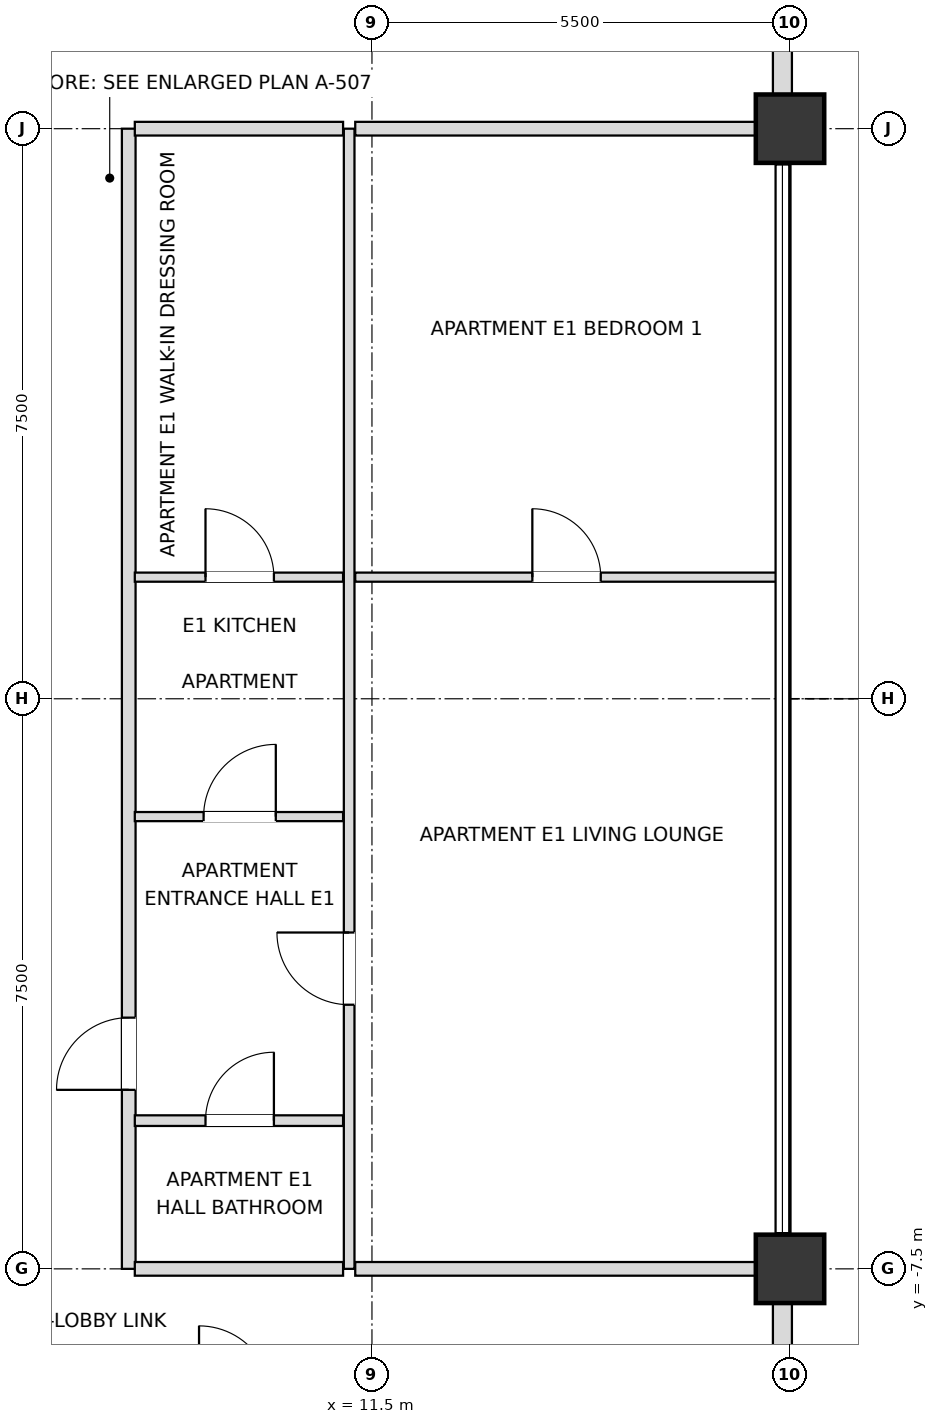
"""IFC4 building model, lengths in metres.
Left out: names, types, materials, properties, quantities, classifications, styles, units other than length and angle.
Written with IfcOpenShell. Run it as: python <this file> out.ifc"""

import sys

from ifc_helpers import new_model, si_unit, direction, frame, frame_2d, origin, origin_2d, place, context, subcontext, project, spatial, rectangle, extrude, element, fill, save


model = new_model("IFC4")
c1 = context("Model", 3, precision=1e-05, world=origin(), true_north=direction((0.0, 1.0)))
c2 = subcontext(c1, "Body", "Model", "MODEL_VIEW")
j1 = project(units=[si_unit("LENGTHUNIT", "METRE"), si_unit("PLANEANGLEUNIT", "RADIAN")], contexts=[c1])
p1 = place(None, origin())
s1 = spatial("IfcSite", under=j1, at=p1, CompositionType="ELEMENT")
p2 = place(p1, origin())
s2 = spatial("IfcBuilding", under=s1, at=p2, CompositionType="ELEMENT")
p3 = place(p2, frame((0.0, 0.0, 251.1)))
s3 = spatial("IfcBuildingStorey", under=s2, at=p3, CompositionType="ELEMENT", Elevation=251.1)
for number, where, z_axis, x_axis in (
    (1, (17.0, -7.5, 0.0), (0.0, 0.0, 1.0), (1.0, 0.0, 0.0)),
    (2, (17.0, 7.5, 0.0), (0.0, 0.0, 1.0), (1.0, 0.0, 0.0)),
):
    element("IfcColumn", number, at=place(p3, frame(where, z_axis=z_axis, x_axis=x_axis)), inside=s3, PredefinedType="USERDEFINED", context=c2, shape_type="SweptSolid", body=[
        extrude(rectangle(XDim=0.9, YDim=0.9, at=origin_2d()), origin(), (0.0, 0.0, 1.0), 3.6),
    ])
p4 = place(p3, frame((16.9, -12.555, 0.0), z_axis=(0.0, 0.0, 1.0), x_axis=(0.0, 1.0, 0.0)))
e3 = element("IfcWall", 3, at=p4, inside=s3, PredefinedType="SOLIDWALL", context=c2, shape_type="SweptSolid", body=[
    extrude(rectangle(XDim=4.61, YDim=0.25, at=frame_2d((2.305, 0.0))), origin(), (0.0, 0.0, 1.0), 2.748),
])
p5 = place(p4, frame((1.405, 0.0, 0.72)))
e4 = element("IfcOpeningElement", 4, at=p5, cuts=e3, PredefinedType="OPENING", context=c2, shape_type="SweptSolid", body=[
    extrude(rectangle(XDim=1.8, YDim=1.68, at=frame_2d((0.9, 0.84))), frame((0.0, 0.135, 0.0), z_axis=(0.0, -1.0, 0.0), x_axis=(1.0, 0.0, 0.0)), (0.0, 0.0, 1.0), 0.27),
])
p6 = place(p3, frame((16.9, 7.945, 0.0), z_axis=(0.0, 0.0, 1.0), x_axis=(0.0, 1.0, 0.0)))
e5 = element("IfcWall", 5, at=p6, inside=s3, PredefinedType="SOLIDWALL", context=c2, shape_type="SweptSolid", body=[
    extrude(rectangle(XDim=4.61, YDim=0.25, at=frame_2d((2.305, 0.0))), origin(), (0.0, 0.0, 1.0), 2.748),
])
p7 = place(p6, frame((1.405, 0.0, 0.72)))
e6 = element("IfcOpeningElement", 6, at=p7, cuts=e5, PredefinedType="OPENING", context=c2, shape_type="SweptSolid", body=[
    extrude(rectangle(XDim=1.8, YDim=1.68, at=frame_2d((0.9, 0.84))), frame((0.0, 0.135, 0.0), z_axis=(0.0, -1.0, 0.0), x_axis=(1.0, 0.0, 0.0)), (0.0, 0.0, 1.0), 0.27),
])
p8 = place(p3, frame((8.3, -7.5, 0.0), z_axis=(0.0, 0.0, 1.0), x_axis=(0.0, 1.0, 0.0)))
e7 = element("IfcWall", 7, at=p8, inside=s3, PredefinedType="PARTITIONING", context=c2, shape_type="SweptSolid", body=[
    extrude(rectangle(XDim=15.0, YDim=0.18, at=frame_2d((7.5, 0.0))), origin(), (0.0, 0.0, 1.0), 3.38),
])
p9 = place(p8, frame((2.355, 0.0, 0.0)))
e8 = element("IfcOpeningElement", 8, at=p9, cuts=e7, PredefinedType="OPENING", context=c2, shape_type="SweptSolid", body=[
    extrude(rectangle(XDim=0.95, YDim=2.15, at=frame_2d((0.475, 1.075))), frame((0.0, 0.1, 0.0), z_axis=(0.0, -1.0, 0.0), x_axis=(1.0, 0.0, 0.0)), (0.0, 0.0, 1.0), 0.2),
])
p10 = place(p3, frame((11.2, -7.5, 0.0), z_axis=(0.0, 0.0, 1.0), x_axis=(0.0, 1.0, 0.0)))
e9 = element("IfcWall", 9, at=p10, inside=s3, PredefinedType="PARTITIONING", context=c2, shape_type="SweptSolid", body=[
    extrude(rectangle(XDim=15.0, YDim=0.14, at=frame_2d((7.5, 0.0))), origin(), (0.0, 0.0, 1.0), 3.38),
])
p11 = place(p10, frame((3.475, 0.0, 0.0)))
e10 = element("IfcOpeningElement", 10, at=p11, cuts=e9, PredefinedType="OPENING", context=c2, shape_type="SweptSolid", body=[
    extrude(rectangle(XDim=0.95, YDim=2.1, at=frame_2d((0.475, 1.05))), frame((0.0, 0.08, 0.0), z_axis=(0.0, -1.0, 0.0), x_axis=(1.0, 0.0, 0.0)), (0.0, 0.0, 1.0), 0.16),
])
p12 = place(p3, frame((8.38, -7.5, 0.0), z_axis=(0.0, 0.0, 1.0), x_axis=(1.0, 0.0, 0.0)))
e11 = element("IfcWall", 11, at=p12, inside=s3, PredefinedType="PARTITIONING", context=c2, shape_type="SweptSolid", body=[
    extrude(rectangle(XDim=2.74, YDim=0.18, at=frame_2d((1.37, 0.0))), origin(), (0.0, 0.0, 1.0), 2.826),
])
p13 = place(p3, frame((11.28, -7.5, 0.0), z_axis=(0.0, 0.0, 1.0), x_axis=(1.0, 0.0, 0.0)))
e12 = element("IfcWall", 12, at=p13, inside=s3, PredefinedType="PARTITIONING", context=c2, shape_type="SweptSolid", body=[
    extrude(rectangle(XDim=5.62, YDim=0.18, at=frame_2d((2.81, 0.0))), origin(), (0.0, 0.0, 1.0), 2.826),
])
p14 = place(p3, frame((8.38, -5.55, 0.0), z_axis=(0.0, 0.0, 1.0), x_axis=(1.0, 0.0, 0.0)))
e13 = element("IfcWall", 13, at=p14, inside=s3, PredefinedType="PARTITIONING", context=c2, shape_type="SweptSolid", body=[
    extrude(rectangle(XDim=2.74, YDim=0.14, at=frame_2d((1.37, 0.0))), origin(), (0.0, 0.0, 1.0), 3.38),
])
p15 = place(p14, frame((0.93, 0.0, 0.0)))
e14 = element("IfcOpeningElement", 14, at=p15, cuts=e13, PredefinedType="OPENING", context=c2, shape_type="SweptSolid", body=[
    extrude(rectangle(XDim=0.9, YDim=2.1, at=frame_2d((0.45, 1.05))), frame((0.0, 0.08, 0.0), z_axis=(0.0, -1.0, 0.0), x_axis=(1.0, 0.0, 0.0)), (0.0, 0.0, 1.0), 0.16),
])
p16 = place(p3, frame((8.38, -1.55, 0.0), z_axis=(0.0, 0.0, 1.0), x_axis=(1.0, 0.0, 0.0)))
e15 = element("IfcWall", 15, at=p16, inside=s3, PredefinedType="PARTITIONING", context=c2, shape_type="SweptSolid", body=[
    extrude(rectangle(XDim=2.74, YDim=0.12, at=frame_2d((1.37, 0.0))), origin(), (0.0, 0.0, 1.0), 3.38),
])
p17 = place(p16, frame((0.905, 0.0, 0.0)))
e16 = element("IfcOpeningElement", 16, at=p17, cuts=e15, PredefinedType="OPENING", context=c2, shape_type="SweptSolid", body=[
    extrude(rectangle(XDim=0.95, YDim=2.1, at=frame_2d((0.475, 1.05))), frame((0.0, 0.07, 0.0), z_axis=(0.0, -1.0, 0.0), x_axis=(1.0, 0.0, 0.0)), (0.0, 0.0, 1.0), 0.14),
])
p18 = place(p3, frame((8.38, 1.6, 0.0), z_axis=(0.0, 0.0, 1.0), x_axis=(1.0, 0.0, 0.0)))
e17 = element("IfcWall", 17, at=p18, inside=s3, PredefinedType="PARTITIONING", context=c2, shape_type="SweptSolid", body=[
    extrude(rectangle(XDim=2.74, YDim=0.12, at=frame_2d((1.37, 0.0))), origin(), (0.0, 0.0, 1.0), 3.38),
])
p19 = place(p18, frame((0.93, 0.0, 0.0)))
e18 = element("IfcOpeningElement", 18, at=p19, cuts=e17, PredefinedType="OPENING", context=c2, shape_type="SweptSolid", body=[
    extrude(rectangle(XDim=0.9, YDim=2.1, at=frame_2d((0.45, 1.05))), frame((0.0, 0.07, 0.0), z_axis=(0.0, -1.0, 0.0), x_axis=(1.0, 0.0, 0.0)), (0.0, 0.0, 1.0), 0.14),
])
p20 = place(p3, frame((11.28, 1.6, 0.0), z_axis=(0.0, 0.0, 1.0), x_axis=(1.0, 0.0, 0.0)))
e19 = element("IfcWall", 19, at=p20, inside=s3, PredefinedType="PARTITIONING", context=c2, shape_type="SweptSolid", body=[
    extrude(rectangle(XDim=5.54, YDim=0.12, at=frame_2d((2.77, 0.0))), origin(), (0.0, 0.0, 1.0), 3.018),
])
p21 = place(p20, frame((2.33, 0.0, 0.0)))
e20 = element("IfcOpeningElement", 20, at=p21, cuts=e19, PredefinedType="OPENING", context=c2, shape_type="SweptSolid", body=[
    extrude(rectangle(XDim=0.9, YDim=2.1, at=frame_2d((0.45, 1.05))), frame((0.0, 0.07, 0.0), z_axis=(0.0, -1.0, 0.0), x_axis=(1.0, 0.0, 0.0)), (0.0, 0.0, 1.0), 0.14),
])
p22 = place(p3, frame((8.38, 7.5, 0.0), z_axis=(0.0, 0.0, 1.0), x_axis=(1.0, 0.0, 0.0)))
e21 = element("IfcWall", 21, at=p22, inside=s3, PredefinedType="PARTITIONING", context=c2, shape_type="SweptSolid", body=[
    extrude(rectangle(XDim=2.74, YDim=0.18, at=frame_2d((1.37, 0.0))), origin(), (0.0, 0.0, 1.0), 2.826),
])
p23 = place(p3, frame((11.28, 7.5, 0.0), z_axis=(0.0, 0.0, 1.0), x_axis=(1.0, 0.0, 0.0)))
e22 = element("IfcWall", 22, at=p23, inside=s3, PredefinedType="PARTITIONING", context=c2, shape_type="SweptSolid", body=[
    extrude(rectangle(XDim=5.62, YDim=0.18, at=frame_2d((2.81, 0.0))), origin(), (0.0, 0.0, 1.0), 2.826),
])
p24 = place(p15, origin())
e23 = element("IfcDoor", 23, at=p24, inside=s3, OperationType="SINGLE_SWING_RIGHT", PredefinedType="DOOR", context=c2, shape_type="SweptSolid", body=[
    extrude(rectangle(XDim=0.9, YDim=2.1, at=frame_2d((0.45, 1.05))), frame((0.0, 0.025, 0.0), z_axis=(0.0, -1.0, 0.0), x_axis=(1.0, 0.0, 0.0)), (0.0, 0.0, 1.0), 0.05),
])
fill(e14, e23)
p25 = place(p9, origin())
e24 = element("IfcDoor", 24, at=p25, inside=s3, OperationType="SINGLE_SWING_LEFT", PredefinedType="DOOR", context=c2, shape_type="SweptSolid", body=[
    extrude(rectangle(XDim=0.95, YDim=2.15, at=frame_2d((0.475, 1.075))), frame((0.0, 0.025, 0.0), z_axis=(0.0, -1.0, 0.0), x_axis=(1.0, 0.0, 0.0)), (0.0, 0.0, 1.0), 0.05),
])
fill(e8, e24)
p26 = place(p17, origin())
e25 = element("IfcDoor", 25, at=p26, inside=s3, OperationType="SINGLE_SWING_RIGHT", PredefinedType="DOOR", context=c2, shape_type="SweptSolid", body=[
    extrude(rectangle(XDim=0.95, YDim=2.1, at=frame_2d((0.475, 1.05))), frame((0.0, 0.025, 0.0), z_axis=(0.0, -1.0, 0.0), x_axis=(1.0, 0.0, 0.0)), (0.0, 0.0, 1.0), 0.05),
])
fill(e16, e25)
p27 = place(p19, origin())
e26 = element("IfcDoor", 26, at=p27, inside=s3, OperationType="SINGLE_SWING_LEFT", PredefinedType="DOOR", context=c2, shape_type="SweptSolid", body=[
    extrude(rectangle(XDim=0.9, YDim=2.1, at=frame_2d((0.45, 1.05))), frame((0.0, 0.025, 0.0), z_axis=(0.0, -1.0, 0.0), x_axis=(1.0, 0.0, 0.0)), (0.0, 0.0, 1.0), 0.05),
])
fill(e18, e26)
p28 = place(p11, origin())
e27 = element("IfcDoor", 27, at=p28, inside=s3, OperationType="SINGLE_SWING_RIGHT", PredefinedType="DOOR", context=c2, shape_type="SweptSolid", body=[
    extrude(rectangle(XDim=0.95, YDim=2.1, at=frame_2d((0.475, 1.05))), frame((0.0, 0.025, 0.0), z_axis=(0.0, -1.0, 0.0), x_axis=(1.0, 0.0, 0.0)), (0.0, 0.0, 1.0), 0.05),
])
fill(e10, e27)
p29 = place(p21, origin())
e28 = element("IfcDoor", 28, at=p29, inside=s3, OperationType="SINGLE_SWING_LEFT", PredefinedType="DOOR", context=c2, shape_type="SweptSolid", body=[
    extrude(rectangle(XDim=0.9, YDim=2.1, at=frame_2d((0.45, 1.05))), frame((0.0, 0.025, 0.0), z_axis=(0.0, -1.0, 0.0), x_axis=(1.0, 0.0, 0.0)), (0.0, 0.0, 1.0), 0.05),
])
fill(e20, e28)
save(model, sys.argv[1])
